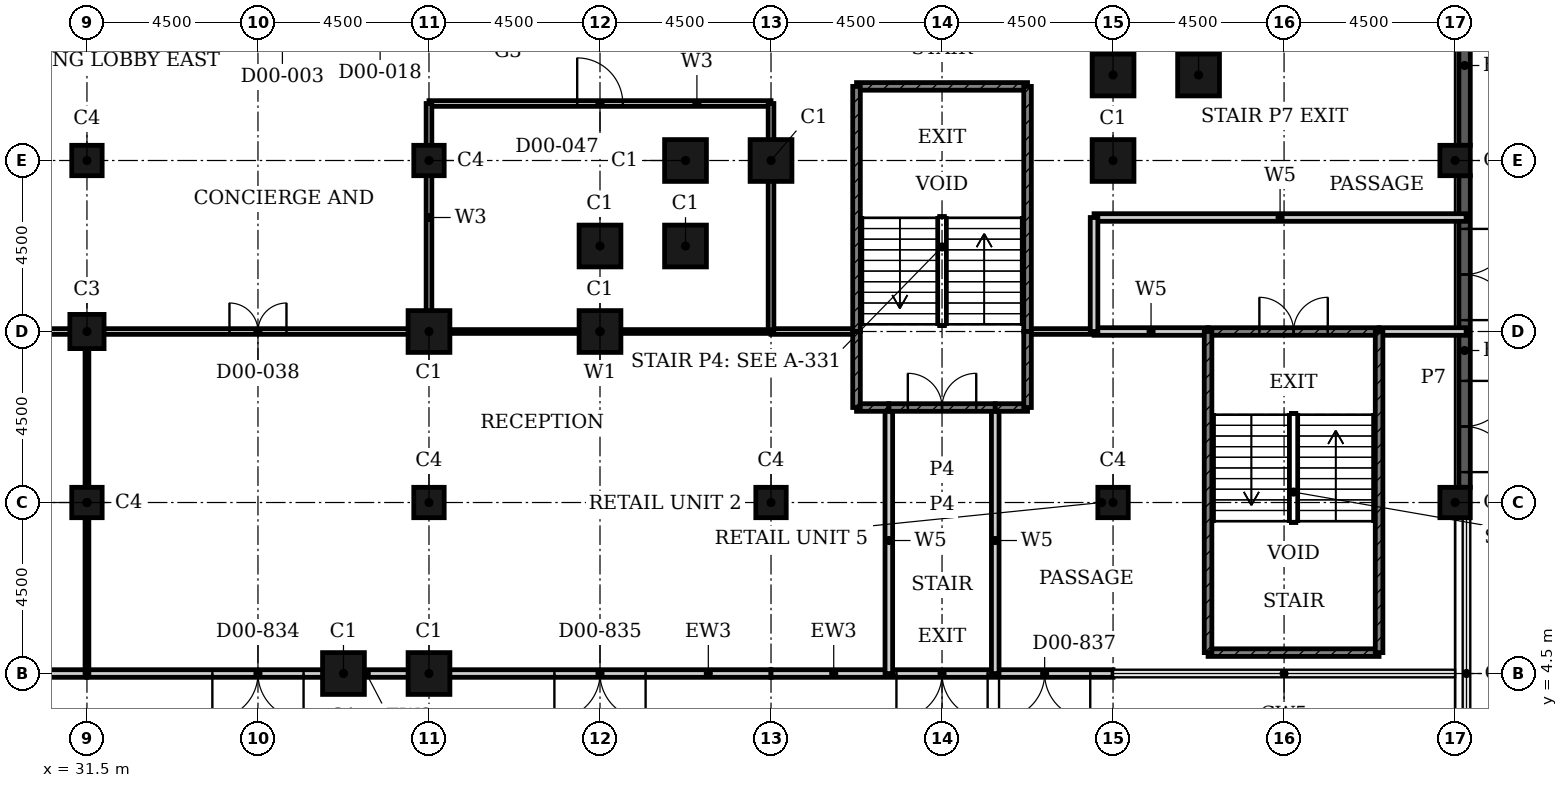
"""IFC4 building model, lengths in metres.
Left out: names, types, materials, properties, quantities, classifications, styles, units other than length and angle.
Written with IfcOpenShell. Run it as: python <this file> out.ifc"""

import sys

from ifc_helpers import new_model, si_unit, direction, frame, frame_2d, origin, origin_2d, place, context, subcontext, project, spatial, rectangle, hollow_rectangle, extrude, element, fill, save


model = new_model("IFC4")
c1 = context("Model", 3, precision=1e-05, world=origin(), true_north=direction((0.0, 1.0)))
c2 = subcontext(c1, "Body", "Model", "MODEL_VIEW")
j1 = project(units=[si_unit("LENGTHUNIT", "METRE"), si_unit("PLANEANGLEUNIT", "RADIAN")], contexts=[c1])
p1 = place(None, origin())
s1 = spatial("IfcSite", under=j1, at=p1, CompositionType="ELEMENT")
p2 = place(p1, origin())
s2 = spatial("IfcBuilding", under=s1, at=p2, CompositionType="ELEMENT")
p3 = place(p2, origin())
s3 = spatial("IfcBuildingStorey", under=s2, at=p3, CompositionType="ELEMENT", Elevation=0.0)
for number, where, z_axis, x_axis in (
    (1, (38.25, 4.5, 0.0), (0.0, 0.0, 1.0), (1.0, 0.0, 0.0)),
    (2, (40.5, 4.5, 0.0), (0.0, 0.0, 1.0), (1.0, 0.0, 0.0)),
    (3, (40.5, 13.5, 0.0), (0.0, 0.0, 1.0), (1.0, 0.0, 0.0)),
    (4, (45.0, 13.5, 0.0), (0.0, 0.0, 1.0), (1.0, 0.0, 0.0)),
    (5, (45.0, 15.75, 0.0), (0.0, 0.0, 1.0), (1.0, 0.0, 0.0)),
    (6, (47.25, 15.75, 0.0), (0.0, 0.0, 1.0), (1.0, 0.0, 0.0)),
    (7, (47.25, 18.0, 0.0), (0.0, 0.0, 1.0), (1.0, 0.0, 0.0)),
    (8, (49.5, 18.0, 0.0), (0.0, 0.0, 1.0), (1.0, 0.0, 0.0)),
    (9, (58.5, 18.0, 0.0), (0.0, 0.0, 1.0), (1.0, 0.0, 0.0)),
    (10, (58.5, 20.25, 0.0), (0.0, 0.0, 1.0), (1.0, 0.0, 0.0)),
    (11, (60.75, 20.25, 0.0), (0.0, 0.0, 1.0), (1.0, 0.0, 0.0)),
):
    element("IfcColumn", number, at=place(p3, frame(where, z_axis=z_axis, x_axis=x_axis)), inside=s3, PredefinedType="COLUMN", context=c2, shape_type="SweptSolid", body=[
        extrude(hollow_rectangle(XDim=1.1, YDim=1.1, WallThickness=0.036, at=origin_2d()), origin(), (0.0, 0.0, 1.0), 6.6),
    ])
p4 = place(p3, frame((31.5, 13.5, 0.0), z_axis=(0.0, 0.0, 1.0), x_axis=(1.0, 0.0, 0.0)))
e12 = element("IfcColumn", 12, at=p4, inside=s3, PredefinedType="COLUMN", context=c2, shape_type="SweptSolid", body=[
    extrude(hollow_rectangle(XDim=0.9, YDim=0.9, WallThickness=0.028, at=origin_2d()), origin(), (0.0, 0.0, 1.0), 6.6),
])
for number, where, z_axis, x_axis in (
    (13, (67.5, 9.0, 0.0), (0.0, 0.0, 1.0), (1.0, 0.0, 0.0)),
    (14, (67.5, 18.0, 0.0), (0.0, 0.0, 1.0), (1.0, 0.0, 0.0)),
    (15, (31.5, 9.0, 0.0), (0.0, 0.0, 1.0), (1.0, 0.0, 0.0)),
    (16, (31.5, 18.0, 0.0), (0.0, 0.0, 1.0), (1.0, 0.0, 0.0)),
    (17, (40.5, 9.0, 0.0), (0.0, 0.0, 1.0), (1.0, 0.0, 0.0)),
    (18, (40.5, 18.0, 0.0), (0.0, 0.0, 1.0), (1.0, 0.0, 0.0)),
    (19, (49.5, 9.0, 0.0), (0.0, 0.0, 1.0), (1.0, 0.0, 0.0)),
    (20, (58.5, 9.0, 0.0), (0.0, 0.0, 1.0), (1.0, 0.0, 0.0)),
):
    element("IfcColumn", number, at=place(p3, frame(where, z_axis=z_axis, x_axis=x_axis)), inside=s3, PredefinedType="COLUMN", context=c2, shape_type="SweptSolid", body=[
        extrude(hollow_rectangle(XDim=0.8, YDim=0.8, WallThickness=0.025, at=origin_2d()), origin(), (0.0, 0.0, 1.0), 6.6),
    ])
p5 = place(p3, frame((67.75, 17.6, 0.0), z_axis=(0.0, 0.0, 1.0), x_axis=(0.0, -1.0, 0.0)))
e21 = element("IfcWall", 21, at=p5, inside=s3, PredefinedType="SOLIDWALL", context=c2, shape_type="SweptSolid", body=[
    extrude(rectangle(XDim=8.2, YDim=0.3, at=frame_2d((4.1, 0.0))), origin(), (0.0, 0.0, 1.0), 6.6),
])
p6 = place(p5, frame((5.4, 0.0, 0.0)))
e22 = element("IfcOpeningElement", 22, at=p6, cuts=e21, PredefinedType="OPENING", context=c2, shape_type="SweptSolid", body=[
    extrude(rectangle(XDim=2.4, YDim=2.4, at=frame_2d((1.2, 1.2))), frame((0.0, 0.16, 0.0), z_axis=(0.0, -1.0, 0.0), x_axis=(1.0, 0.0, 0.0)), (0.0, 0.0, 1.0), 0.32),
])
p7 = place(p5, frame((1.4, 0.0, 0.0)))
e23 = element("IfcOpeningElement", 23, at=p7, cuts=e21, PredefinedType="OPENING", context=c2, shape_type="SweptSolid", body=[
    extrude(rectangle(XDim=2.4, YDim=2.4, at=frame_2d((1.2, 1.2))), frame((0.0, 0.16, 0.0), z_axis=(0.0, -1.0, 0.0), x_axis=(1.0, 0.0, 0.0)), (0.0, 0.0, 1.0), 0.32),
])
p8 = place(p3, frame((67.75, 26.6, 0.0), z_axis=(0.0, 0.0, 1.0), x_axis=(0.0, -1.0, 0.0)))
e24 = element("IfcWall", 24, at=p8, inside=s3, PredefinedType="SOLIDWALL", context=c2, shape_type="SweptSolid", body=[
    extrude(rectangle(XDim=8.2, YDim=0.3, at=frame_2d((4.1, 0.0))), origin(), (0.0, 0.0, 1.0), 6.6),
])
p9 = place(p8, frame((1.6, 0.0, 0.0)))
e25 = element("IfcOpeningElement", 25, at=p9, cuts=e24, PredefinedType="OPENING", context=c2, shape_type="SweptSolid", body=[
    extrude(rectangle(XDim=2.4, YDim=2.4, at=frame_2d((1.2, 1.2))), frame((0.0, 0.16, 0.0), z_axis=(0.0, -1.0, 0.0), x_axis=(1.0, 0.0, 0.0)), (0.0, 0.0, 1.0), 0.32),
])
p10 = place(p3, frame((31.5, 4.5, 0.0), z_axis=(0.0, 0.0, 1.0), x_axis=(-1.0, 0.0, 0.0)))
e26 = element("IfcWall", 26, at=p10, inside=s3, PredefinedType="SOLIDWALL", context=c2, shape_type="SweptSolid", body=[
    extrude(rectangle(XDim=9.0, YDim=0.2, at=frame_2d((4.5, 0.0))), origin(), (0.0, 0.0, 1.0), 6.25),
])
p11 = place(p10, frame((3.3, 0.0, 0.0)))
e27 = element("IfcOpeningElement", 27, at=p11, cuts=e26, PredefinedType="OPENING", context=c2, shape_type="SweptSolid", body=[
    extrude(rectangle(XDim=2.4, YDim=2.4, at=frame_2d((1.2, 1.2))), frame((0.0, 0.11, 0.0), z_axis=(0.0, -1.0, 0.0), x_axis=(1.0, 0.0, 0.0)), (0.0, 0.0, 1.0), 0.22),
])
p12 = place(p3, frame((40.5, 4.5, 0.0), z_axis=(0.0, 0.0, 1.0), x_axis=(-1.0, 0.0, 0.0)))
e28 = element("IfcWall", 28, at=p12, inside=s3, PredefinedType="SOLIDWALL", context=c2, shape_type="SweptSolid", body=[
    extrude(rectangle(XDim=9.0, YDim=0.2, at=frame_2d((4.5, 0.0))), origin(), (0.0, 0.0, 1.0), 6.25),
])
p13 = place(p12, frame((3.3, 0.0, 0.0)))
e29 = element("IfcOpeningElement", 29, at=p13, cuts=e28, PredefinedType="OPENING", context=c2, shape_type="SweptSolid", body=[
    extrude(rectangle(XDim=2.4, YDim=2.4, at=frame_2d((1.2, 1.2))), frame((0.0, 0.11, 0.0), z_axis=(0.0, -1.0, 0.0), x_axis=(1.0, 0.0, 0.0)), (0.0, 0.0, 1.0), 0.22),
])
p14 = place(p3, frame((49.5, 4.5, 0.0), z_axis=(0.0, 0.0, 1.0), x_axis=(-1.0, 0.0, 0.0)))
e30 = element("IfcWall", 30, at=p14, inside=s3, PredefinedType="SOLIDWALL", context=c2, shape_type="SweptSolid", body=[
    extrude(rectangle(XDim=9.0, YDim=0.2, at=frame_2d((4.5, 0.0))), origin(), (0.0, 0.0, 1.0), 6.25),
])
p15 = place(p14, frame((3.3, 0.0, 0.0)))
e31 = element("IfcOpeningElement", 31, at=p15, cuts=e30, PredefinedType="OPENING", context=c2, shape_type="SweptSolid", body=[
    extrude(rectangle(XDim=2.4, YDim=2.4, at=frame_2d((1.2, 1.2))), frame((0.0, 0.11, 0.0), z_axis=(0.0, -1.0, 0.0), x_axis=(1.0, 0.0, 0.0)), (0.0, 0.0, 1.0), 0.22),
])
p16 = place(p3, frame((58.5, 4.5, 0.0), z_axis=(0.0, 0.0, 1.0), x_axis=(-1.0, 0.0, 0.0)))
e32 = element("IfcWall", 32, at=p16, inside=s3, PredefinedType="SOLIDWALL", context=c2, shape_type="SweptSolid", body=[
    extrude(rectangle(XDim=9.0, YDim=0.2, at=frame_2d((4.5, 0.0))), origin(), (0.0, 0.0, 1.0), 6.25),
])
p17 = place(p16, frame((3.3, 0.0, 0.0)))
e33 = element("IfcOpeningElement", 33, at=p17, cuts=e32, PredefinedType="OPENING", context=c2, shape_type="SweptSolid", body=[
    extrude(rectangle(XDim=2.4, YDim=2.4, at=frame_2d((1.2, 1.2))), frame((0.0, 0.11, 0.0), z_axis=(0.0, -1.0, 0.0), x_axis=(1.0, 0.0, 0.0)), (0.0, 0.0, 1.0), 0.22),
])
p18 = place(p16, frame((0.6, 0.0, 0.0)))
e34 = element("IfcOpeningElement", 34, at=p18, cuts=e32, PredefinedType="OPENING", context=c2, shape_type="SweptSolid", body=[
    extrude(rectangle(XDim=2.4, YDim=2.4, at=frame_2d((1.2, 1.2))), frame((0.0, 0.11, 0.0), z_axis=(0.0, -1.0, 0.0), x_axis=(1.0, 0.0, 0.0)), (0.0, 0.0, 1.0), 0.22),
])
p19 = place(p3, frame((11.25, 13.5, 0.0), z_axis=(0.0, 0.0, 1.0), x_axis=(1.0, 0.0, 0.0)))
e35 = element("IfcWall", 35, at=p19, inside=s3, PredefinedType="PARTITIONING", context=c2, shape_type="SweptSolid", body=[
    extrude(rectangle(XDim=20.25, YDim=0.15, at=frame_2d((10.125, 0.0))), origin(), (0.0, 0.0, 1.0), 6.25),
])
p20 = place(p19, frame((8.925, 0.0, 0.0)))
e36 = element("IfcOpeningElement", 36, at=p20, cuts=e35, PredefinedType="OPENING", context=c2, shape_type="SweptSolid", body=[
    extrude(rectangle(XDim=1.5, YDim=2.4, at=frame_2d((0.75, 1.2))), frame((0.0, 0.085, 0.0), z_axis=(0.0, -1.0, 0.0), x_axis=(1.0, 0.0, 0.0)), (0.0, 0.0, 1.0), 0.17),
])
p21 = place(p3, frame((31.5, 13.5, 0.0), z_axis=(0.0, 0.0, 1.0), x_axis=(1.0, 0.0, 0.0)))
e37 = element("IfcWall", 37, at=p21, inside=s3, PredefinedType="PARTITIONING", context=c2, shape_type="SweptSolid", body=[
    extrude(rectangle(XDim=9.0, YDim=0.15, at=frame_2d((4.5, 0.0))), origin(), (0.0, 0.0, 1.0), 6.25),
])
p22 = place(p21, frame((3.75, 0.0, 0.0)))
e38 = element("IfcOpeningElement", 38, at=p22, cuts=e37, PredefinedType="OPENING", context=c2, shape_type="SweptSolid", body=[
    extrude(rectangle(XDim=1.5, YDim=2.4, at=frame_2d((0.75, 1.2))), frame((0.0, 0.085, 0.0), z_axis=(0.0, -1.0, 0.0), x_axis=(1.0, 0.0, 0.0)), (0.0, 0.0, 1.0), 0.17),
])
p23 = place(p3, frame((49.5, 13.5, 0.0), z_axis=(0.0, 0.0, 1.0), x_axis=(1.0, 0.0, 0.0)))
e39 = element("IfcWall", 39, at=p23, inside=s3, PredefinedType="PARTITIONING", context=c2, shape_type="SweptSolid", body=[
    extrude(rectangle(XDim=2.25, YDim=0.15, at=frame_2d((1.125, 0.0))), origin(), (0.0, 0.0, 1.0), 6.25),
])
p24 = place(p3, frame((56.25, 13.5, 0.0), z_axis=(0.0, 0.0, 1.0), x_axis=(1.0, 0.0, 0.0)))
e40 = element("IfcWall", 40, at=p24, inside=s3, PredefinedType="PARTITIONING", context=c2, shape_type="SweptSolid", body=[
    extrude(rectangle(XDim=1.75, YDim=0.15, at=frame_2d((0.875, 0.0))), origin(), (0.0, 0.0, 1.0), 6.25),
])
p25 = place(p3, frame((40.5, 19.5, 0.0), z_axis=(0.0, 0.0, 1.0), x_axis=(1.0, 0.0, 0.0)))
e41 = element("IfcWall", 41, at=p25, inside=s3, PredefinedType="PARTITIONING", context=c2, shape_type="SweptSolid", body=[
    extrude(rectangle(XDim=9.0, YDim=0.15, at=frame_2d((4.5, 0.0))), origin(), (0.0, 0.0, 1.0), 6.25),
])
p26 = place(p25, frame((3.9, 0.0, 0.0)))
e42 = element("IfcOpeningElement", 42, at=p26, cuts=e41, PredefinedType="OPENING", context=c2, shape_type="SweptSolid", body=[
    extrude(rectangle(XDim=1.2, YDim=2.4, at=frame_2d((0.6, 1.2))), frame((0.0, 0.085, 0.0), z_axis=(0.0, -1.0, 0.0), x_axis=(1.0, 0.0, 0.0)), (0.0, 0.0, 1.0), 0.17),
])
for number, where, z_axis, x_axis in (
    (43, (40.5, 13.5, 0.0), (0.0, 0.0, 1.0), (0.0, 1.0, 0.0)),
    (44, (49.5, 13.5, 0.0), (0.0, 0.0, 1.0), (0.0, 1.0, 0.0)),
):
    element("IfcWall", number, at=place(p3, frame(where, z_axis=z_axis, x_axis=x_axis)), inside=s3, PredefinedType="PARTITIONING", context=c2, shape_type="SweptSolid", body=[
        extrude(rectangle(XDim=6.0, YDim=0.15, at=frame_2d((3.0, 0.0))), origin(), (0.0, 0.0, 1.0), 6.25),
    ])
for number, where, z_axis, x_axis in (
    (45, (40.5, 13.5, 0.0), (0.0, 0.0, 1.0), (1.0, 0.0, 0.0)),
    (46, (31.5, 4.5, 0.0), (0.0, 0.0, 1.0), (0.0, 1.0, 0.0)),
):
    element("IfcWall", number, at=place(p3, frame(where, z_axis=z_axis, x_axis=x_axis)), inside=s3, PredefinedType="PARTITIONING", context=c2, shape_type="SweptSolid", body=[
        extrude(rectangle(XDim=9.0, YDim=0.1, at=frame_2d((4.5, 0.0))), origin(), (0.0, 0.0, 1.0), 6.25),
    ])
p27 = place(p3, frame((58.0, 13.5, 0.0), z_axis=(0.0, 0.0, 1.0), x_axis=(1.0, 0.0, 0.0)))
e47 = element("IfcWall", 47, at=p27, inside=s3, PredefinedType="PARTITIONING", context=c2, shape_type="SweptSolid", body=[
    extrude(rectangle(XDim=3.0, YDim=0.2, at=frame_2d((1.5, 0.0))), origin(), (0.0, 0.0, 1.0), 6.25),
])
p28 = place(p3, frame((65.5, 13.5, 0.0), z_axis=(0.0, 0.0, 1.0), x_axis=(1.0, 0.0, 0.0)))
e48 = element("IfcWall", 48, at=p28, inside=s3, PredefinedType="PARTITIONING", context=c2, shape_type="SweptSolid", body=[
    extrude(rectangle(XDim=2.29, YDim=0.2, at=frame_2d((1.145, 0.0))), origin(), (0.0, 0.0, 1.0), 6.25),
])
p29 = place(p3, frame((58.0, 16.5, 0.0), z_axis=(0.0, 0.0, 1.0), x_axis=(1.0, 0.0, 0.0)))
e49 = element("IfcWall", 49, at=p29, inside=s3, PredefinedType="PARTITIONING", context=c2, shape_type="SweptSolid", body=[
    extrude(rectangle(XDim=9.79, YDim=0.2, at=frame_2d((4.895, 0.0))), origin(), (0.0, 0.0, 1.0), 6.25),
])
for number, where, z_axis, x_axis in (
    (50, (52.6, 4.5, 0.0), (0.0, 0.0, 1.0), (0.0, 1.0, 0.0)),
    (51, (55.4, 4.5, 0.0), (0.0, 0.0, 1.0), (0.0, 1.0, 0.0)),
):
    element("IfcWall", number, at=place(p3, frame(where, z_axis=z_axis, x_axis=x_axis)), inside=s3, PredefinedType="PARTITIONING", context=c2, shape_type="SweptSolid", body=[
        extrude(rectangle(XDim=7.0, YDim=0.2, at=frame_2d((3.5, 0.0))), origin(), (0.0, 0.0, 1.0), 6.25),
    ])
p30 = place(p3, frame((58.0, 13.5, 0.0), z_axis=(0.0, 0.0, 1.0), x_axis=(0.0, 1.0, 0.0)))
e52 = element("IfcWall", 52, at=p30, inside=s3, PredefinedType="PARTITIONING", context=c2, shape_type="SweptSolid", body=[
    extrude(rectangle(XDim=3.0, YDim=0.2, at=frame_2d((1.5, 0.0))), origin(), (0.0, 0.0, 1.0), 6.25),
])
p31 = place(p3, frame((52.6, 11.5, 0.0), z_axis=(0.0, 0.0, 1.0), x_axis=(1.0, 0.0, 0.0)))
e53 = element("IfcWall", 53, at=p31, inside=s3, PredefinedType="SHEAR", context=c2, shape_type="SweptSolid", body=[
    extrude(rectangle(XDim=2.8, YDim=0.2, at=frame_2d((1.4, 0.0))), origin(), (0.0, 0.0, 1.0), 6.25),
])
p32 = place(p31, frame((0.5, 0.0, 0.0)))
e54 = element("IfcOpeningElement", 54, at=p32, cuts=e53, PredefinedType="OPENING", context=c2, shape_type="SweptSolid", body=[
    extrude(rectangle(XDim=1.8, YDim=2.1, at=frame_2d((0.9, 1.05))), frame((0.0, 0.11, 0.0), z_axis=(0.0, -1.0, 0.0), x_axis=(1.0, 0.0, 0.0)), (0.0, 0.0, 1.0), 0.22),
])
for number, where, z_axis, x_axis in (
    (55, (51.75, 11.5, 0.0), (0.0, 0.0, 1.0), (1.0, 0.0, 0.0)),
    (56, (55.4, 11.5, 0.0), (0.0, 0.0, 1.0), (1.0, 0.0, 0.0)),
):
    element("IfcWall", number, at=place(p3, frame(where, z_axis=z_axis, x_axis=x_axis)), inside=s3, PredefinedType="SHEAR", context=c2, shape_type="SweptSolid", body=[
        extrude(rectangle(XDim=0.85, YDim=0.2, at=frame_2d((0.425, 0.0))), origin(), (0.0, 0.0, 1.0), 6.25),
    ])
p33 = place(p3, frame((61.0, 13.5, 0.0), z_axis=(0.0, 0.0, 1.0), x_axis=(1.0, 0.0, 0.0)))
e57 = element("IfcWall", 57, at=p33, inside=s3, PredefinedType="SHEAR", context=c2, shape_type="SweptSolid", body=[
    extrude(rectangle(XDim=4.5, YDim=0.2, at=frame_2d((2.25, 0.0))), origin(), (0.0, 0.0, 1.0), 6.25),
])
p34 = place(p33, frame((1.35, 0.0, 0.0)))
e58 = element("IfcOpeningElement", 58, at=p34, cuts=e57, PredefinedType="OPENING", context=c2, shape_type="SweptSolid", body=[
    extrude(rectangle(XDim=1.8, YDim=2.1, at=frame_2d((0.9, 1.05))), frame((0.0, 0.11, 0.0), z_axis=(0.0, -1.0, 0.0), x_axis=(1.0, 0.0, 0.0)), (0.0, 0.0, 1.0), 0.22),
])
for number, where, z_axis, x_axis in (
    (59, (51.75, 19.95, 0.0), (0.0, 0.0, 1.0), (1.0, 0.0, 0.0)),
    (60, (61.0, 5.05, 0.0), (0.0, 0.0, 1.0), (1.0, 0.0, 0.0)),
):
    element("IfcWall", number, at=place(p3, frame(where, z_axis=z_axis, x_axis=x_axis)), inside=s3, PredefinedType="SHEAR", context=c2, shape_type="SweptSolid", body=[
        extrude(rectangle(XDim=4.5, YDim=0.2, at=frame_2d((2.25, 0.0))), origin(), (0.0, 0.0, 1.0), 6.25),
    ])
p35 = place(p3, frame((51.75, 13.5, 0.0), z_axis=(0.0, 0.0, 1.0), x_axis=(0.0, 1.0, 0.0)))
e61 = element("IfcWall", 61, at=p35, inside=s3, PredefinedType="SHEAR", context=c2, shape_type="SweptSolid", body=[
    extrude(rectangle(XDim=6.45, YDim=0.2, at=frame_2d((3.225, 0.0))), origin(), (0.0, 0.0, 1.0), 6.25),
])
p36 = place(p3, frame((51.75, 11.5, 0.0), z_axis=(0.0, 0.0, 1.0), x_axis=(0.0, 1.0, 0.0)))
e62 = element("IfcWall", 62, at=p36, inside=s3, PredefinedType="SHEAR", context=c2, shape_type="SweptSolid", body=[
    extrude(rectangle(XDim=2.0, YDim=0.2, at=frame_2d((1.0, 0.0))), origin(), (0.0, 0.0, 1.0), 6.25),
])
p37 = place(p3, frame((56.25, 13.5, 0.0), z_axis=(0.0, 0.0, 1.0), x_axis=(0.0, 1.0, 0.0)))
e63 = element("IfcWall", 63, at=p37, inside=s3, PredefinedType="SHEAR", context=c2, shape_type="SweptSolid", body=[
    extrude(rectangle(XDim=6.45, YDim=0.2, at=frame_2d((3.225, 0.0))), origin(), (0.0, 0.0, 1.0), 6.25),
])
p38 = place(p3, frame((56.25, 11.5, 0.0), z_axis=(0.0, 0.0, 1.0), x_axis=(0.0, 1.0, 0.0)))
e64 = element("IfcWall", 64, at=p38, inside=s3, PredefinedType="SHEAR", context=c2, shape_type="SweptSolid", body=[
    extrude(rectangle(XDim=2.0, YDim=0.2, at=frame_2d((1.0, 0.0))), origin(), (0.0, 0.0, 1.0), 6.25),
])
for number, where, z_axis, x_axis in (
    (65, (61.0, 5.05, 0.0), (0.0, 0.0, 1.0), (0.0, 1.0, 0.0)),
    (66, (65.5, 5.05, 0.0), (0.0, 0.0, 1.0), (0.0, 1.0, 0.0)),
):
    element("IfcWall", number, at=place(p3, frame(where, z_axis=z_axis, x_axis=x_axis)), inside=s3, PredefinedType="SHEAR", context=c2, shape_type="SweptSolid", body=[
        extrude(rectangle(XDim=8.45, YDim=0.2, at=frame_2d((4.225, 0.0))), origin(), (0.0, 0.0, 1.0), 6.25),
    ])
p39 = place(p6, origin())
e67 = element("IfcDoor", 67, at=p39, inside=s3, OperationType="DOUBLE_DOOR_SINGLE_SWING", PredefinedType="DOOR", context=c2, shape_type="SweptSolid", body=[
    extrude(rectangle(XDim=2.4, YDim=2.4, at=frame_2d((1.2, 1.2))), frame((0.0, 0.025, 0.0), z_axis=(0.0, -1.0, 0.0), x_axis=(1.0, 0.0, 0.0)), (0.0, 0.0, 1.0), 0.05),
])
fill(e22, e67)
p40 = place(p7, origin())
e68 = element("IfcDoor", 68, at=p40, inside=s3, OperationType="DOUBLE_DOOR_SINGLE_SWING", PredefinedType="DOOR", context=c2, shape_type="SweptSolid", body=[
    extrude(rectangle(XDim=2.4, YDim=2.4, at=frame_2d((1.2, 1.2))), frame((0.0, 0.025, 0.0), z_axis=(0.0, -1.0, 0.0), x_axis=(1.0, 0.0, 0.0)), (0.0, 0.0, 1.0), 0.05),
])
fill(e23, e68)
p41 = place(p13, origin())
e69 = element("IfcDoor", 69, at=p41, inside=s3, OperationType="DOUBLE_DOOR_SINGLE_SWING", PredefinedType="DOOR", context=c2, shape_type="SweptSolid", body=[
    extrude(rectangle(XDim=2.4, YDim=2.4, at=frame_2d((1.2, 1.2))), frame((0.0, 0.025, 0.0), z_axis=(0.0, -1.0, 0.0), x_axis=(1.0, 0.0, 0.0)), (0.0, 0.0, 1.0), 0.05),
])
fill(e29, e69)
p42 = place(p15, origin())
e70 = element("IfcDoor", 70, at=p42, inside=s3, OperationType="DOUBLE_DOOR_SINGLE_SWING", PredefinedType="DOOR", context=c2, shape_type="SweptSolid", body=[
    extrude(rectangle(XDim=2.4, YDim=2.4, at=frame_2d((1.2, 1.2))), frame((0.0, 0.025, 0.0), z_axis=(0.0, -1.0, 0.0), x_axis=(1.0, 0.0, 0.0)), (0.0, 0.0, 1.0), 0.05),
])
fill(e31, e70)
p43 = place(p17, origin())
e71 = element("IfcDoor", 71, at=p43, inside=s3, OperationType="DOUBLE_DOOR_SINGLE_SWING", PredefinedType="DOOR", context=c2, shape_type="SweptSolid", body=[
    extrude(rectangle(XDim=2.4, YDim=2.4, at=frame_2d((1.2, 1.2))), frame((0.0, 0.025, 0.0), z_axis=(0.0, -1.0, 0.0), x_axis=(1.0, 0.0, 0.0)), (0.0, 0.0, 1.0), 0.05),
])
fill(e33, e71)
p44 = place(p18, origin())
e72 = element("IfcDoor", 72, at=p44, inside=s3, OperationType="DOUBLE_DOOR_SINGLE_SWING", PredefinedType="DOOR", context=c2, shape_type="SweptSolid", body=[
    extrude(rectangle(XDim=2.4, YDim=2.4, at=frame_2d((1.2, 1.2))), frame((0.0, 0.025, 0.0), z_axis=(0.0, -1.0, 0.0), x_axis=(1.0, 0.0, 0.0)), (0.0, 0.0, 1.0), 0.05),
])
fill(e34, e72)
p45 = place(p32, origin())
e73 = element("IfcDoor", 73, at=p45, inside=s3, OperationType="DOUBLE_DOOR_SINGLE_SWING", PredefinedType="DOOR", context=c2, shape_type="SweptSolid", body=[
    extrude(rectangle(XDim=1.8, YDim=2.1, at=frame_2d((0.9, 1.05))), frame((0.0, 0.025, 0.0), z_axis=(0.0, -1.0, 0.0), x_axis=(1.0, 0.0, 0.0)), (0.0, 0.0, 1.0), 0.05),
])
fill(e54, e73)
p46 = place(p34, origin())
e74 = element("IfcDoor", 74, at=p46, inside=s3, OperationType="DOUBLE_DOOR_SINGLE_SWING", PredefinedType="DOOR", context=c2, shape_type="SweptSolid", body=[
    extrude(rectangle(XDim=1.8, YDim=2.1, at=frame_2d((0.9, 1.05))), frame((0.0, 0.025, 0.0), z_axis=(0.0, -1.0, 0.0), x_axis=(1.0, 0.0, 0.0)), (0.0, 0.0, 1.0), 0.05),
])
fill(e58, e74)
p47 = place(p22, origin())
e75 = element("IfcDoor", 75, at=p47, inside=s3, OperationType="DOUBLE_DOOR_SINGLE_SWING", PredefinedType="DOOR", context=c2, shape_type="SweptSolid", body=[
    extrude(rectangle(XDim=1.5, YDim=2.4, at=frame_2d((0.75, 1.2))), frame((0.0, 0.025, 0.0), z_axis=(0.0, -1.0, 0.0), x_axis=(1.0, 0.0, 0.0)), (0.0, 0.0, 1.0), 0.05),
])
fill(e38, e75)
p48 = place(p26, origin())
e76 = element("IfcDoor", 76, at=p48, inside=s3, OperationType="SINGLE_SWING_LEFT", PredefinedType="DOOR", context=c2, shape_type="SweptSolid", body=[
    extrude(rectangle(XDim=1.2, YDim=2.4, at=frame_2d((0.6, 1.2))), frame((0.0, 0.025, 0.0), z_axis=(0.0, -1.0, 0.0), x_axis=(1.0, 0.0, 0.0)), (0.0, 0.0, 1.0), 0.05),
])
fill(e42, e76)
save(model, sys.argv[1])
